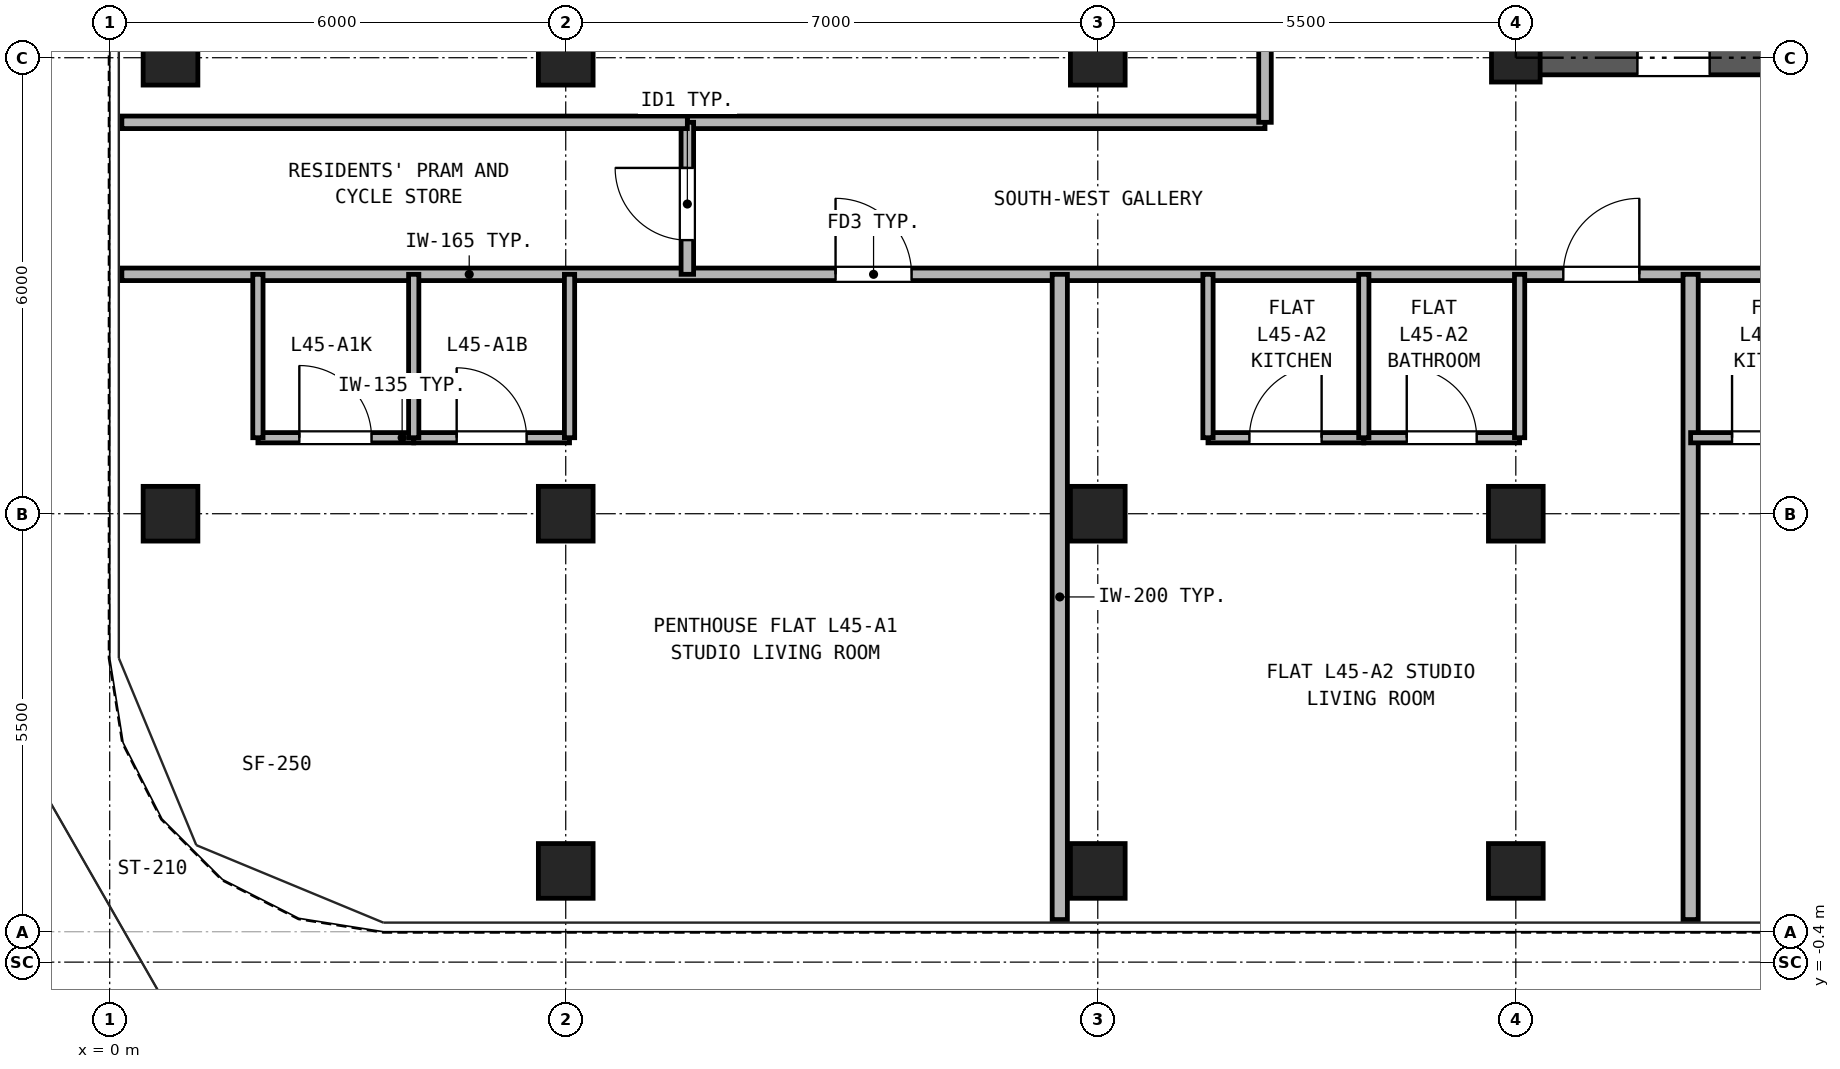
"""IFC4 building model, lengths in metres.
Left out: names, types, materials, properties, quantities, classifications, styles, units other than length and angle.
Written with IfcOpenShell. Run it as: python <this file> out.ifc"""

import sys

from ifc_helpers import new_model, si_unit, direction, frame, frame_2d, origin, origin_2d, place, context, subcontext, project, spatial, rectangle, hollow_rectangle, extrude, source, transform, mapped, element, fill, save


model = new_model("IFC4")
c1 = context("Model", 3, precision=1e-05, world=origin(), true_north=direction((0.0, 1.0)))
c2 = subcontext(c1, "Body", "Model", "MODEL_VIEW")
j1 = project(units=[si_unit("LENGTHUNIT", "METRE"), si_unit("PLANEANGLEUNIT", "RADIAN")], contexts=[c1])
p1 = place(None, origin())
s1 = spatial("IfcSite", under=j1, at=p1, CompositionType="ELEMENT")
p2 = place(p1, origin())
s2 = spatial("IfcBuilding", under=s1, at=p2, CompositionType="ELEMENT")
p3 = place(p2, frame((0.0, 0.0, 162.5)))
s3 = spatial("IfcBuildingStorey", under=s2, at=p3, CompositionType="ELEMENT", Elevation=162.5)
m1 = source(origin(), c2, "Body", "SweptSolid", [
    extrude(hollow_rectangle(XDim=0.72, YDim=0.72, WallThickness=0.04, at=origin_2d()), origin(), (0.0, 0.0, 1.0), 2.95),
])
for number, where, z_axis, x_axis in (
    (1, (6.0, 0.8, 0.0), (0.0, 0.0, 1.0), (1.0, 0.0, 0.0)),
    (2, (13.0, 0.8, 0.0), (0.0, 0.0, 1.0), (1.0, 0.0, 0.0)),
    (3, (18.5, 0.8, 0.0), (0.0, 0.0, 1.0), (1.0, 0.0, 0.0)),
    (4, (0.8, 5.5, 0.0), (0.0, 0.0, 1.0), (1.0, 0.0, 0.0)),
    (5, (0.8, 11.5, 0.0), (0.0, 0.0, 1.0), (1.0, 0.0, 0.0)),
    (6, (6.0, 5.5, 0.0), (0.0, 0.0, 1.0), (1.0, 0.0, 0.0)),
    (7, (6.0, 11.5, 0.0), (0.0, 0.0, 1.0), (1.0, 0.0, 0.0)),
    (8, (13.0, 5.5, 0.0), (0.0, 0.0, 1.0), (1.0, 0.0, 0.0)),
    (9, (13.0, 11.5, 0.0), (0.0, 0.0, 1.0), (1.0, 0.0, 0.0)),
    (10, (18.5, 5.5, 0.0), (0.0, 0.0, 1.0), (1.0, 0.0, 0.0)),
):
    element("IfcColumn", number, at=place(p3, frame(where, z_axis=z_axis, x_axis=x_axis)), inside=s3, PredefinedType="COLUMN", context=c2, shape_type="MappedRepresentation", body=[
        mapped(m1, transform((0.0, 0.0, 0.0), x_axis=(1.0, 0.0, 0.0), y_axis=(0.0, 1.0, 0.0), z_axis=(0.0, 0.0, 1.0), scale=1.0)),
    ])
m2 = source(origin(), c2, "Body", "SweptSolid", [
    extrude(hollow_rectangle(XDim=0.64, YDim=0.64, WallThickness=0.035, at=origin_2d()), origin(), (0.0, 0.0, 1.0), 2.95),
])
p4 = place(p3, frame((18.5, 11.5, 0.0), z_axis=(0.0, 0.0, 1.0), x_axis=(1.0, 0.0, 0.0)))
e11 = element("IfcColumn", 11, at=p4, inside=s3, PredefinedType="COLUMN", context=c2, shape_type="MappedRepresentation", body=[
    mapped(m2, transform((0.0, 0.0, 0.0), x_axis=(1.0, 0.0, 0.0), y_axis=(0.0, 1.0, 0.0), z_axis=(0.0, 0.0, 1.0), scale=1.0)),
])
p5 = place(p3, frame((18.275, 11.5, 0.0), z_axis=(0.0, 0.0, 1.0), x_axis=(1.0, 0.0, 0.0)))
e12 = element("IfcWall", 12, at=p5, inside=s3, PredefinedType="SHEAR", context=c2, shape_type="SweptSolid", body=[
    extrude(rectangle(XDim=10.45, YDim=0.45, at=frame_2d((5.225, 0.0))), origin(), (0.0, 0.0, 1.0), 2.95),
])
p6 = place(p5, frame((1.825, 0.0, 0.0)))
e13 = element("IfcOpeningElement", 13, at=p6, cuts=e12, PredefinedType="OPENING", context=c2, shape_type="SweptSolid", body=[
    extrude(rectangle(XDim=0.95, YDim=2.15, at=frame_2d((0.475, 1.075))), frame((0.0, 0.235, 0.0), z_axis=(0.0, -1.0, 0.0), x_axis=(1.0, 0.0, 0.0)), (0.0, 0.0, 1.0), 0.47),
])
p7 = place(p5, frame((5.325, 0.0, 0.0)))
e14 = element("IfcOpeningElement", 14, at=p7, cuts=e12, PredefinedType="OPENING", context=c2, shape_type="SweptSolid", body=[
    extrude(rectangle(XDim=0.95, YDim=2.15, at=frame_2d((0.475, 1.075))), frame((0.0, 0.235, 0.0), z_axis=(0.0, -1.0, 0.0), x_axis=(1.0, 0.0, 0.0)), (0.0, 0.0, 1.0), 0.47),
])
p8 = place(p5, frame((8.225, 0.0, 0.0)))
e15 = element("IfcOpeningElement", 15, at=p8, cuts=e12, PredefinedType="OPENING", context=c2, shape_type="SweptSolid", body=[
    extrude(rectangle(XDim=1.1, YDim=2.25, at=frame_2d((0.55, 1.125))), frame((0.0, 0.235, 0.0), z_axis=(0.0, -1.0, 0.0), x_axis=(1.0, 0.0, 0.0)), (0.0, 0.0, 1.0), 0.47),
])
p9 = place(p3, frame((0.16, 8.65, 0.0), z_axis=(0.0, 0.0, 1.0), x_axis=(1.0, 0.0, 0.0)))
e16 = element("IfcWall", 16, at=p9, inside=s3, PredefinedType="PARTITIONING", context=c2, shape_type="SweptSolid", body=[
    extrude(rectangle(XDim=41.48, YDim=0.165, at=frame_2d((20.74, 0.0))), origin(), (0.0, 0.0, 1.0), 2.583),
])
p10 = place(p9, frame((9.39, 0.0, 0.0)))
e17 = element("IfcOpeningElement", 17, at=p10, cuts=e16, PredefinedType="OPENING", context=c2, shape_type="SweptSolid", body=[
    extrude(rectangle(XDim=1.0, YDim=2.15, at=frame_2d((0.5, 1.075))), frame((0.0, 0.093, 0.0), z_axis=(0.0, -1.0, 0.0), x_axis=(1.0, 0.0, 0.0)), (0.0, 0.0, 1.0), 0.185),
])
p11 = place(p9, frame((18.965, 0.0, 0.0)))
e18 = element("IfcOpeningElement", 18, at=p11, cuts=e16, PredefinedType="OPENING", context=c2, shape_type="SweptSolid", body=[
    extrude(rectangle(XDim=1.0, YDim=2.15, at=frame_2d((0.5, 1.075))), frame((0.0, 0.093, 0.0), z_axis=(0.0, -1.0, 0.0), x_axis=(1.0, 0.0, 0.0)), (0.0, 0.0, 1.0), 0.185),
])
p12 = place(p9, frame((26.34, 0.0, 0.0)))
e19 = element("IfcOpeningElement", 19, at=p12, cuts=e16, PredefinedType="OPENING", context=c2, shape_type="SweptSolid", body=[
    extrude(rectangle(XDim=1.0, YDim=2.15, at=frame_2d((0.5, 1.075))), frame((0.0, 0.093, 0.0), z_axis=(0.0, -1.0, 0.0), x_axis=(1.0, 0.0, 0.0)), (0.0, 0.0, 1.0), 0.185),
])
p13 = place(p9, frame((31.715, 0.0, 0.0)))
e20 = element("IfcOpeningElement", 20, at=p13, cuts=e16, PredefinedType="OPENING", context=c2, shape_type="SweptSolid", body=[
    extrude(rectangle(XDim=1.0, YDim=2.15, at=frame_2d((0.5, 1.075))), frame((0.0, 0.093, 0.0), z_axis=(0.0, -1.0, 0.0), x_axis=(1.0, 0.0, 0.0)), (0.0, 0.0, 1.0), 0.185),
])
p14 = place(p3, frame((7.6, 10.65, 0.0), z_axis=(0.0, 0.0, 1.0), x_axis=(1.0, 0.0, 0.0)))
e21 = element("IfcWall", 21, at=p14, inside=s3, PredefinedType="PARTITIONING", context=c2, shape_type="SweptSolid", body=[
    extrude(rectangle(XDim=7.6, YDim=0.165, at=frame_2d((3.8, 0.0))), origin(), (0.0, 0.0, 1.0), 2.95),
])
p15 = place(p3, frame((7.6, 8.65, 0.0), z_axis=(0.0, 0.0, 1.0), x_axis=(0.0, 1.0, 0.0)))
e22 = element("IfcWall", 22, at=p15, inside=s3, PredefinedType="PARTITIONING", context=c2, shape_type="SweptSolid", body=[
    extrude(rectangle(XDim=2.0, YDim=0.165, at=frame_2d((1.0, 0.0))), origin(), (0.0, 0.0, 1.0), 2.95),
])
p16 = place(p15, frame((0.45, 0.0, 0.0)))
e23 = element("IfcOpeningElement", 23, at=p16, cuts=e22, PredefinedType="OPENING", context=c2, shape_type="SweptSolid", body=[
    extrude(rectangle(XDim=0.95, YDim=2.15, at=frame_2d((0.475, 1.075))), frame((0.0, 0.093, 0.0), z_axis=(0.0, -1.0, 0.0), x_axis=(1.0, 0.0, 0.0)), (0.0, 0.0, 1.0), 0.185),
])
p17 = place(p3, frame((15.2, 10.65, 0.0), z_axis=(0.0, 0.0, 1.0), x_axis=(0.0, 1.0, 0.0)))
e24 = element("IfcWall", 24, at=p17, inside=s3, PredefinedType="PARTITIONING", context=c2, shape_type="SweptSolid", body=[
    extrude(rectangle(XDim=24.49, YDim=0.165, at=frame_2d((12.245, 0.0))), origin(), (0.0, 0.0, 1.0), 2.95),
])
p18 = place(p17, frame((3.425, 0.0, 0.0)))
e25 = element("IfcOpeningElement", 25, at=p18, cuts=e24, PredefinedType="OPENING", context=c2, shape_type="SweptSolid", body=[
    extrude(rectangle(XDim=0.95, YDim=2.15, at=frame_2d((0.475, 1.075))), frame((0.0, 0.093, 0.0), z_axis=(0.0, -1.0, 0.0), x_axis=(1.0, 0.0, 0.0)), (0.0, 0.0, 1.0), 0.185),
])
p19 = place(p17, frame((10.85, 0.0, 0.0)))
e26 = element("IfcOpeningElement", 26, at=p19, cuts=e24, PredefinedType="OPENING", context=c2, shape_type="SweptSolid", body=[
    extrude(rectangle(XDim=0.95, YDim=2.15, at=frame_2d((0.475, 1.075))), frame((0.0, 0.093, 0.0), z_axis=(0.0, -1.0, 0.0), x_axis=(1.0, 0.0, 0.0)), (0.0, 0.0, 1.0), 0.185),
])
p20 = place(p17, frame((16.7, 0.0, 0.0)))
e27 = element("IfcOpeningElement", 27, at=p20, cuts=e24, PredefinedType="OPENING", context=c2, shape_type="SweptSolid", body=[
    extrude(rectangle(XDim=0.95, YDim=2.15, at=frame_2d((0.475, 1.075))), frame((0.0, 0.093, 0.0), z_axis=(0.0, -1.0, 0.0), x_axis=(1.0, 0.0, 0.0)), (0.0, 0.0, 1.0), 0.185),
])
p21 = place(p17, frame((21.52, 0.0, 0.0)))
e28 = element("IfcOpeningElement", 28, at=p21, cuts=e24, PredefinedType="OPENING", context=c2, shape_type="SweptSolid", body=[
    extrude(rectangle(XDim=0.92, YDim=2.1, at=frame_2d((0.46, 1.05))), frame((0.0, 0.093, 0.0), z_axis=(0.0, -1.0, 0.0), x_axis=(1.0, 0.0, 0.0)), (0.0, 0.0, 1.0), 0.185),
])
p22 = place(p3, frame((1.95, 6.5, 0.0), z_axis=(0.0, 0.0, 1.0), x_axis=(1.0, 0.0, 0.0)))
e29 = element("IfcWall", 29, at=p22, inside=s3, PredefinedType="PARTITIONING", context=c2, shape_type="SweptSolid", body=[
    extrude(rectangle(XDim=2.05, YDim=0.135, at=frame_2d((1.025, 0.0))), origin(), (0.0, 0.0, 1.0), 2.95),
])
p23 = place(p22, frame((0.545, 0.0, 0.0)))
e30 = element("IfcOpeningElement", 30, at=p23, cuts=e29, PredefinedType="OPENING", context=c2, shape_type="SweptSolid", body=[
    extrude(rectangle(XDim=0.95, YDim=2.15, at=frame_2d((0.475, 1.075))), frame((0.0, 0.077, 0.0), z_axis=(0.0, -1.0, 0.0), x_axis=(1.0, 0.0, 0.0)), (0.0, 0.0, 1.0), 0.155),
])
p24 = place(p3, frame((4.0, 6.5, 0.0), z_axis=(0.0, 0.0, 1.0), x_axis=(1.0, 0.0, 0.0)))
e31 = element("IfcWall", 31, at=p24, inside=s3, PredefinedType="PARTITIONING", context=c2, shape_type="SweptSolid", body=[
    extrude(rectangle(XDim=2.05, YDim=0.135, at=frame_2d((1.025, 0.0))), origin(), (0.0, 0.0, 1.0), 2.95),
])
p25 = place(p24, frame((0.565, 0.0, 0.0)))
e32 = element("IfcOpeningElement", 32, at=p25, cuts=e31, PredefinedType="OPENING", context=c2, shape_type="SweptSolid", body=[
    extrude(rectangle(XDim=0.92, YDim=2.1, at=frame_2d((0.46, 1.05))), frame((0.0, 0.077, 0.0), z_axis=(0.0, -1.0, 0.0), x_axis=(1.0, 0.0, 0.0)), (0.0, 0.0, 1.0), 0.155),
])
for number, where, z_axis, x_axis in (
    (33, (1.95, 6.5, 0.0), (0.0, 0.0, 1.0), (0.0, 1.0, 0.0)),
    (34, (4.0, 6.5, 0.0), (0.0, 0.0, 1.0), (0.0, 1.0, 0.0)),
):
    element("IfcWall", number, at=place(p3, frame(where, z_axis=z_axis, x_axis=x_axis)), inside=s3, PredefinedType="PARTITIONING", context=c2, shape_type="SweptSolid", body=[
        extrude(rectangle(XDim=2.15, YDim=0.135, at=frame_2d((1.075, 0.0))), origin(), (0.0, 0.0, 1.0), 2.95),
    ])
p26 = place(p3, frame((6.05, 6.5, 0.0), z_axis=(0.0, 0.0, 1.0), x_axis=(0.0, 1.0, 0.0)))
e35 = element("IfcWall", 35, at=p26, inside=s3, PredefinedType="PARTITIONING", context=c2, shape_type="SweptSolid", body=[
    extrude(rectangle(XDim=2.15, YDim=0.135, at=frame_2d((1.075, 0.0))), origin(), (0.0, 0.0, 1.0), 2.323),
])
p27 = place(p3, frame((12.5, 0.16, 0.0), z_axis=(0.0, 0.0, 1.0), x_axis=(0.0, 1.0, 0.0)))
e36 = element("IfcWall", 36, at=p27, inside=s3, PredefinedType="PARTITIONING", context=c2, shape_type="SweptSolid", body=[
    extrude(rectangle(XDim=8.49, YDim=0.2, at=frame_2d((4.245, 0.0))), origin(), (0.0, 0.0, 1.0), 2.95),
])
p28 = place(p3, frame((14.45, 6.5, 0.0), z_axis=(0.0, 0.0, 1.0), x_axis=(1.0, 0.0, 0.0)))
e37 = element("IfcWall", 37, at=p28, inside=s3, PredefinedType="PARTITIONING", context=c2, shape_type="SweptSolid", body=[
    extrude(rectangle(XDim=2.05, YDim=0.135, at=frame_2d((1.025, 0.0))), origin(), (0.0, 0.0, 1.0), 2.95),
])
p29 = place(p28, frame((0.545, 0.0, 0.0)))
e38 = element("IfcOpeningElement", 38, at=p29, cuts=e37, PredefinedType="OPENING", context=c2, shape_type="SweptSolid", body=[
    extrude(rectangle(XDim=0.95, YDim=2.15, at=frame_2d((0.475, 1.075))), frame((0.0, 0.077, 0.0), z_axis=(0.0, -1.0, 0.0), x_axis=(1.0, 0.0, 0.0)), (0.0, 0.0, 1.0), 0.155),
])
p30 = place(p3, frame((16.5, 6.5, 0.0), z_axis=(0.0, 0.0, 1.0), x_axis=(1.0, 0.0, 0.0)))
e39 = element("IfcWall", 39, at=p30, inside=s3, PredefinedType="PARTITIONING", context=c2, shape_type="SweptSolid", body=[
    extrude(rectangle(XDim=2.05, YDim=0.135, at=frame_2d((1.025, 0.0))), origin(), (0.0, 0.0, 1.0), 2.95),
])
p31 = place(p30, frame((0.565, 0.0, 0.0)))
e40 = element("IfcOpeningElement", 40, at=p31, cuts=e39, PredefinedType="OPENING", context=c2, shape_type="SweptSolid", body=[
    extrude(rectangle(XDim=0.92, YDim=2.1, at=frame_2d((0.46, 1.05))), frame((0.0, 0.077, 0.0), z_axis=(0.0, -1.0, 0.0), x_axis=(1.0, 0.0, 0.0)), (0.0, 0.0, 1.0), 0.155),
])
for number, where, z_axis, x_axis in (
    (41, (14.45, 6.5, 0.0), (0.0, 0.0, 1.0), (0.0, 1.0, 0.0)),
    (42, (16.5, 6.5, 0.0), (0.0, 0.0, 1.0), (0.0, 1.0, 0.0)),
):
    element("IfcWall", number, at=place(p3, frame(where, z_axis=z_axis, x_axis=x_axis)), inside=s3, PredefinedType="PARTITIONING", context=c2, shape_type="SweptSolid", body=[
        extrude(rectangle(XDim=2.15, YDim=0.135, at=frame_2d((1.075, 0.0))), origin(), (0.0, 0.0, 1.0), 2.95),
    ])
p32 = place(p3, frame((18.55, 6.5, 0.0), z_axis=(0.0, 0.0, 1.0), x_axis=(0.0, 1.0, 0.0)))
e43 = element("IfcWall", 43, at=p32, inside=s3, PredefinedType="PARTITIONING", context=c2, shape_type="SweptSolid", body=[
    extrude(rectangle(XDim=2.15, YDim=0.135, at=frame_2d((1.075, 0.0))), origin(), (0.0, 0.0, 1.0), 2.323),
])
p33 = place(p3, frame((20.8, 0.16, 0.0), z_axis=(0.0, 0.0, 1.0), x_axis=(0.0, 1.0, 0.0)))
e44 = element("IfcWall", 44, at=p33, inside=s3, PredefinedType="PARTITIONING", context=c2, shape_type="SweptSolid", body=[
    extrude(rectangle(XDim=8.49, YDim=0.2, at=frame_2d((4.245, 0.0))), origin(), (0.0, 0.0, 1.0), 2.95),
])
p34 = place(p3, frame((20.8, 6.5, 0.0), z_axis=(0.0, 0.0, 1.0), x_axis=(1.0, 0.0, 0.0)))
e45 = element("IfcWall", 45, at=p34, inside=s3, PredefinedType="PARTITIONING", context=c2, shape_type="SweptSolid", body=[
    extrude(rectangle(XDim=2.05, YDim=0.135, at=frame_2d((1.025, 0.0))), origin(), (0.0, 0.0, 1.0), 2.95),
])
p35 = place(p34, frame((0.545, 0.0, 0.0)))
e46 = element("IfcOpeningElement", 46, at=p35, cuts=e45, PredefinedType="OPENING", context=c2, shape_type="SweptSolid", body=[
    extrude(rectangle(XDim=0.95, YDim=2.15, at=frame_2d((0.475, 1.075))), frame((0.0, 0.077, 0.0), z_axis=(0.0, -1.0, 0.0), x_axis=(1.0, 0.0, 0.0)), (0.0, 0.0, 1.0), 0.155),
])
p36 = place(p3, frame((0.16, 10.65, 0.0), z_axis=(0.0, 0.0, 1.0), x_axis=(1.0, 0.0, 0.0)))
e47 = element("IfcWall", 47, at=p36, inside=s3, PredefinedType="PARTITIONING", context=c2, shape_type="SweptSolid", body=[
    extrude(rectangle(XDim=7.44, YDim=0.165, at=frame_2d((3.72, 0.0))), origin(), (0.0, 0.0, 1.0), 2.95),
])
p37 = place(p6, frame((0.95, 0.0, 0.0), z_axis=(0.0, 0.0, 1.0), x_axis=(-1.0, 0.0, 0.0)))
e48 = element("IfcDoor", 48, at=p37, inside=s3, OperationType="SINGLE_SWING_LEFT", PredefinedType="DOOR", context=c2, shape_type="SweptSolid", body=[
    extrude(rectangle(XDim=0.95, YDim=2.15, at=frame_2d((0.475, 1.075))), frame((0.0, 0.025, 0.0), z_axis=(0.0, -1.0, 0.0), x_axis=(1.0, 0.0, 0.0)), (0.0, 0.0, 1.0), 0.05),
])
fill(e13, e48)
p38 = place(p23, origin())
e49 = element("IfcDoor", 49, at=p38, inside=s3, OperationType="SINGLE_SWING_LEFT", PredefinedType="DOOR", context=c2, shape_type="SweptSolid", body=[
    extrude(rectangle(XDim=0.95, YDim=2.15, at=frame_2d((0.475, 1.075))), frame((0.0, 0.025, 0.0), z_axis=(0.0, -1.0, 0.0), x_axis=(1.0, 0.0, 0.0)), (0.0, 0.0, 1.0), 0.05),
])
fill(e30, e49)
p39 = place(p25, origin())
e50 = element("IfcDoor", 50, at=p39, inside=s3, OperationType="SINGLE_SWING_LEFT", PredefinedType="DOOR", context=c2, shape_type="SweptSolid", body=[
    extrude(rectangle(XDim=0.92, YDim=2.1, at=frame_2d((0.46, 1.05))), frame((0.0, 0.025, 0.0), z_axis=(0.0, -1.0, 0.0), x_axis=(1.0, 0.0, 0.0)), (0.0, 0.0, 1.0), 0.05),
])
fill(e32, e50)
p40 = place(p10, frame((1.0, 0.0, 0.0), z_axis=(0.0, 0.0, 1.0), x_axis=(-1.0, 0.0, 0.0)))
e51 = element("IfcDoor", 51, at=p40, inside=s3, OperationType="SINGLE_SWING_LEFT", PredefinedType="DOOR", context=c2, shape_type="SweptSolid", body=[
    extrude(rectangle(XDim=1.0, YDim=2.15, at=frame_2d((0.5, 1.075))), frame((0.0, 0.025, 0.0), z_axis=(0.0, -1.0, 0.0), x_axis=(1.0, 0.0, 0.0)), (0.0, 0.0, 1.0), 0.05),
])
fill(e17, e51)
p41 = place(p29, origin())
e52 = element("IfcDoor", 52, at=p41, inside=s3, OperationType="SINGLE_SWING_RIGHT", PredefinedType="DOOR", context=c2, shape_type="SweptSolid", body=[
    extrude(rectangle(XDim=0.95, YDim=2.15, at=frame_2d((0.475, 1.075))), frame((0.0, 0.025, 0.0), z_axis=(0.0, -1.0, 0.0), x_axis=(1.0, 0.0, 0.0)), (0.0, 0.0, 1.0), 0.05),
])
fill(e38, e52)
p42 = place(p31, origin())
e53 = element("IfcDoor", 53, at=p42, inside=s3, OperationType="SINGLE_SWING_LEFT", PredefinedType="DOOR", context=c2, shape_type="SweptSolid", body=[
    extrude(rectangle(XDim=0.92, YDim=2.1, at=frame_2d((0.46, 1.05))), frame((0.0, 0.025, 0.0), z_axis=(0.0, -1.0, 0.0), x_axis=(1.0, 0.0, 0.0)), (0.0, 0.0, 1.0), 0.05),
])
fill(e40, e53)
p43 = place(p11, frame((1.0, 0.0, 0.0), z_axis=(0.0, 0.0, 1.0), x_axis=(-1.0, 0.0, 0.0)))
e54 = element("IfcDoor", 54, at=p43, inside=s3, OperationType="SINGLE_SWING_RIGHT", PredefinedType="DOOR", context=c2, shape_type="SweptSolid", body=[
    extrude(rectangle(XDim=1.0, YDim=2.15, at=frame_2d((0.5, 1.075))), frame((0.0, 0.025, 0.0), z_axis=(0.0, -1.0, 0.0), x_axis=(1.0, 0.0, 0.0)), (0.0, 0.0, 1.0), 0.05),
])
fill(e18, e54)
p44 = place(p35, origin())
e55 = element("IfcDoor", 55, at=p44, inside=s3, OperationType="SINGLE_SWING_LEFT", PredefinedType="DOOR", context=c2, shape_type="SweptSolid", body=[
    extrude(rectangle(XDim=0.95, YDim=2.15, at=frame_2d((0.475, 1.075))), frame((0.0, 0.025, 0.0), z_axis=(0.0, -1.0, 0.0), x_axis=(1.0, 0.0, 0.0)), (0.0, 0.0, 1.0), 0.05),
])
fill(e46, e55)
p45 = place(p16, frame((0.95, 0.0, 0.0), z_axis=(0.0, 0.0, 1.0), x_axis=(-1.0, 0.0, 0.0)))
e56 = element("IfcDoor", 56, at=p45, inside=s3, OperationType="SINGLE_SWING_RIGHT", PredefinedType="DOOR", context=c2, shape_type="SweptSolid", body=[
    extrude(rectangle(XDim=0.95, YDim=2.15, at=frame_2d((0.475, 1.075))), frame((0.0, 0.025, 0.0), z_axis=(0.0, -1.0, 0.0), x_axis=(1.0, 0.0, 0.0)), (0.0, 0.0, 1.0), 0.05),
])
fill(e23, e56)
save(model, sys.argv[1])
